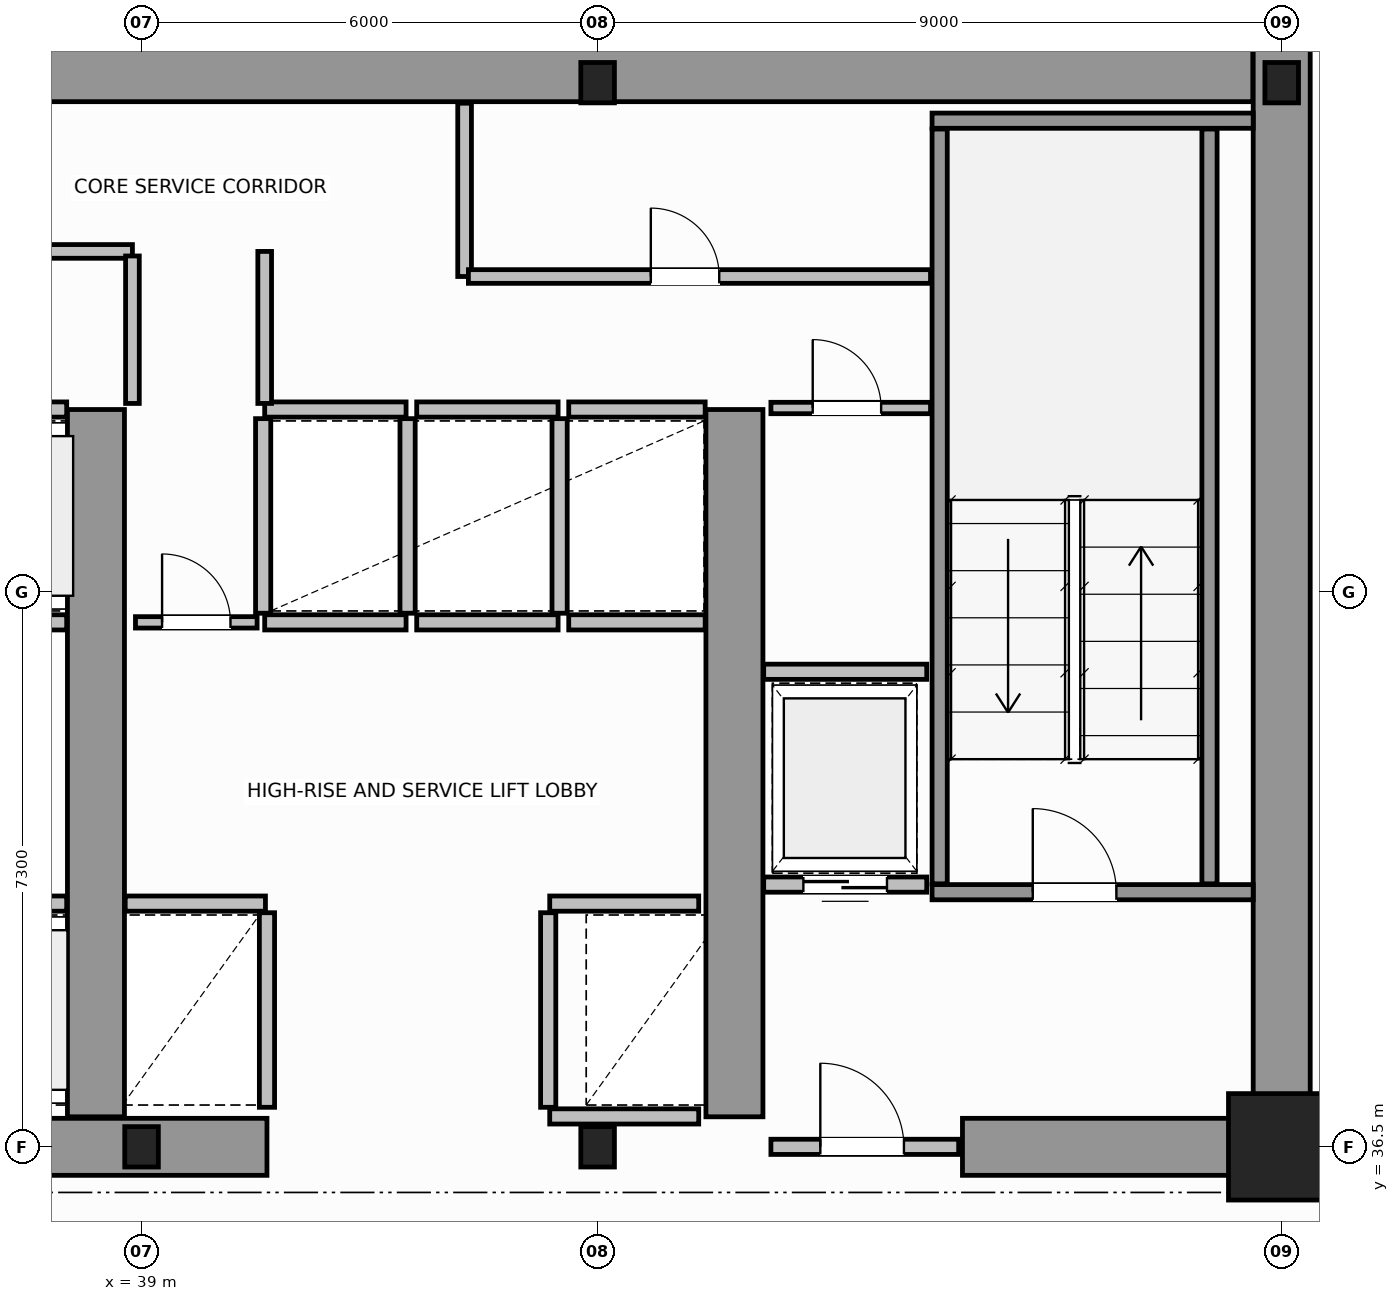
"""IFC4 building model, lengths in metres.
Left out: names, types, materials, properties, quantities, classifications, styles, units other than length and angle.
Written with IfcOpenShell. Run it as: python <this file> out.ifc"""

import sys

from ifc_helpers import new_model, si_unit, direction, frame, frame_2d, origin, origin_2d, place, context, subcontext, project, spatial, rectangle, i_section, extrude, source, transform, mapped, element, fill, save


model = new_model("IFC4")
c1 = context("Model", 3, precision=1e-05, world=origin(), true_north=direction((0.0, 1.0)))
c2 = subcontext(c1, "Body", "Model", "MODEL_VIEW")
j1 = project(units=[si_unit("LENGTHUNIT", "METRE"), si_unit("PLANEANGLEUNIT", "RADIAN")], contexts=[c1])
p1 = place(None, origin())
s1 = spatial("IfcSite", under=j1, at=p1, CompositionType="ELEMENT")
p2 = place(p1, origin())
s2 = spatial("IfcBuilding", under=s1, at=p2, CompositionType="ELEMENT")
p3 = place(p2, frame((0.0, 0.0, 122.4)))
s3 = spatial("IfcBuildingStorey", under=s2, at=p3, CompositionType="ELEMENT", Elevation=122.4)
m1 = source(origin(), c2, "Body", "SweptSolid", [
    extrude(i_section(OverallWidth=0.442, OverallDepth=0.531, WebThickness=0.065, FlangeThickness=0.076, FilletRadius=0.015, at=origin_2d()), origin(), (0.0, 0.0, 1.0), 3.8),
])
for number, where, z_axis, x_axis in (
    (1, (39.0, 36.5, 0.0), (0.0, 0.0, 1.0), (1.0, 0.0, 0.0)),
    (2, (45.0, 36.5, 0.0), (0.0, 0.0, 1.0), (1.0, 0.0, 0.0)),
):
    element("IfcColumn", number, at=place(p3, frame(where, z_axis=z_axis, x_axis=x_axis)), inside=s3, PredefinedType="COLUMN", context=c2, shape_type="MappedRepresentation", body=[
        mapped(m1, transform((0.0, 0.0, 0.0), scale=1.0)),
    ])
m2 = source(origin(), c2, "Body", "SweptSolid", [
    extrude(rectangle(XDim=1.4, YDim=1.4, at=origin_2d()), origin(), (0.0, 0.0, 1.0), 3.8),
])
p4 = place(p3, frame((54.0, 36.5, 0.0), z_axis=(0.0, 0.0, 1.0), x_axis=(1.0, 0.0, 0.0)))
e3 = element("IfcColumn", 3, at=p4, inside=s3, PredefinedType="COLUMN", context=c2, shape_type="MappedRepresentation", body=[
    mapped(m2, transform((0.0, 0.0, 0.0), scale=1.0)),
])
for number, where, z_axis, x_axis in (
    (4, (45.0, 50.5, 0.0), (0.0, 0.0, 1.0), (1.0, 0.0, 0.0)),
    (5, (54.0, 50.5, 0.0), (0.0, 0.0, 1.0), (1.0, 0.0, 0.0)),
):
    element("IfcColumn", number, at=place(p3, frame(where, z_axis=z_axis, x_axis=x_axis)), inside=s3, PredefinedType="COLUMN", context=c2, shape_type="MappedRepresentation", body=[
        mapped(m1, transform((0.0, 0.0, 0.0), scale=1.0)),
    ])
p5 = place(p3, frame((34.002, 50.625, 0.0), z_axis=(0.0, 0.0, 1.0), x_axis=(1.0, 0.0, 0.0)))
e6 = element("IfcWall", 6, at=p5, inside=s3, PredefinedType="SHEAR", context=c2, shape_type="SweptSolid", body=[
    extrude(rectangle(XDim=19.619, YDim=0.75, at=frame_2d((9.81, 0.0))), origin(), (0.0, 0.0, 1.0), 3.8),
])
p6 = place(p3, frame((54.0, 36.5, 0.0), z_axis=(0.0, 0.0, 1.0), x_axis=(0.0, 1.0, 0.0)))
e7 = element("IfcWall", 7, at=p6, inside=s3, PredefinedType="SHEAR", context=c2, shape_type="SweptSolid", body=[
    extrude(rectangle(XDim=14.5, YDim=0.75, at=frame_2d((7.25, 0.0))), origin(), (0.0, 0.0, 1.0), 3.8),
])
p7 = place(p3, frame((36.15, 36.5, 0.0), z_axis=(0.0, 0.0, 1.0), x_axis=(1.0, 0.0, 0.0)))
e8 = element("IfcWall", 8, at=p7, inside=s3, PredefinedType="SHEAR", context=c2, shape_type="SweptSolid", body=[
    extrude(rectangle(XDim=4.5, YDim=0.75, at=frame_2d((2.25, 0.0))), origin(), (0.0, 0.0, 1.0), 3.8),
])
p8 = place(p3, frame((49.8, 36.5, 0.0), z_axis=(0.0, 0.0, 1.0), x_axis=(1.0, 0.0, 0.0)))
e9 = element("IfcWall", 9, at=p8, inside=s3, PredefinedType="SHEAR", context=c2, shape_type="SweptSolid", body=[
    extrude(rectangle(XDim=3.805, YDim=0.75, at=frame_2d((1.902, 0.0))), origin(), (0.0, 0.0, 1.0), 2.38),
])
for number, where, z_axis, x_axis in (
    (10, (38.4, 36.895, 0.0), (0.0, 0.0, 1.0), (0.0, 1.0, 0.0)),
    (11, (46.8, 36.895, 0.0), (0.0, 0.0, 1.0), (0.0, 1.0, 0.0)),
):
    element("IfcWall", number, at=place(p3, frame(where, z_axis=z_axis, x_axis=x_axis)), inside=s3, PredefinedType="SHEAR", context=c2, shape_type="SweptSolid", body=[
        extrude(rectangle(XDim=9.305, YDim=0.75, at=frame_2d((4.652, 0.0))), origin(), (0.0, 0.0, 1.0), 3.8),
    ])
p9 = place(p3, frame((49.4, 39.85, 0.0), z_axis=(0.0, 0.0, 1.0), x_axis=(1.0, 0.0, 0.0)))
e12 = element("IfcWall", 12, at=p9, inside=s3, PredefinedType="SOLIDWALL", context=c2, shape_type="SweptSolid", body=[
    extrude(rectangle(XDim=4.225, YDim=0.2, at=frame_2d((2.113, 0.0))), origin(), (0.0, 0.0, 1.0), 3.8),
])
p10 = place(p9, frame((1.325, 0.0, 0.0)))
e13 = element("IfcOpeningElement", 13, at=p10, cuts=e12, PredefinedType="OPENING", context=c2, shape_type="SweptSolid", body=[
    extrude(rectangle(XDim=1.1, YDim=2.15, at=frame_2d((0.55, 1.075))), frame((0.0, 0.11, 0.0), z_axis=(0.0, -1.0, 0.0), x_axis=(1.0, 0.0, 0.0)), (0.0, 0.0, 1.0), 0.22),
])
p11 = place(p3, frame((49.4, 50.0, 0.0), z_axis=(0.0, 0.0, 1.0), x_axis=(1.0, 0.0, 0.0)))
e14 = element("IfcWall", 14, at=p11, inside=s3, PredefinedType="SOLIDWALL", context=c2, shape_type="SweptSolid", body=[
    extrude(rectangle(XDim=4.225, YDim=0.2, at=frame_2d((2.113, 0.0))), origin(), (0.0, 0.0, 1.0), 3.8),
])
for number, where, z_axis, x_axis in (
    (15, (49.5, 39.96, 0.0), (0.0, 0.0, 1.0), (0.0, 1.0, 0.0)),
    (16, (53.05, 39.96, 0.0), (0.0, 0.0, 1.0), (0.0, 1.0, 0.0)),
):
    element("IfcWall", number, at=place(p3, frame(where, z_axis=z_axis, x_axis=x_axis)), inside=s3, PredefinedType="SOLIDWALL", context=c2, shape_type="SweptSolid", body=[
        extrude(rectangle(XDim=9.93, YDim=0.2, at=frame_2d((4.965, 0.0))), origin(), (0.0, 0.0, 1.0), 3.8),
    ])
p12 = place(p3, frame((47.28, 36.5, 0.0), z_axis=(0.0, 0.0, 1.0), x_axis=(1.0, 0.0, 0.0)))
e17 = element("IfcWall", 17, at=p12, inside=s3, PredefinedType="SOLIDWALL", context=c2, shape_type="SweptSolid", body=[
    extrude(rectangle(XDim=2.47, YDim=0.2, at=frame_2d((1.235, 0.0))), origin(), (0.0, 0.0, 1.0), 2.37),
])
p13 = place(p12, frame((0.65, 0.0, 0.0)))
e18 = element("IfcOpeningElement", 18, at=p13, cuts=e17, PredefinedType="OPENING", context=c2, shape_type="SweptSolid", body=[
    extrude(rectangle(XDim=1.1, YDim=2.15, at=frame_2d((0.55, 1.075))), frame((0.0, 0.11, 0.0), z_axis=(0.0, -1.0, 0.0), x_axis=(1.0, 0.0, 0.0)), (0.0, 0.0, 1.0), 0.22),
])
p14 = place(p3, frame((36.17, 39.7, 0.0), z_axis=(0.0, 0.0, 1.0), x_axis=(1.0, 0.0, 0.0)))
e19 = element("IfcWall", 19, at=p14, inside=s3, PredefinedType="SOLIDWALL", context=c2, shape_type="SweptSolid", body=[
    extrude(rectangle(XDim=1.845, YDim=0.2, at=frame_2d((0.922, 0.0))), origin(), (0.0, 0.0, 1.0), 3.58),
])
p15 = place(p14, frame((0.372, 0.0, 0.0)))
e20 = element("IfcOpeningElement", 20, at=p15, cuts=e19, PredefinedType="OPENING", context=c2, shape_type="SweptSolid", body=[
    extrude(rectangle(XDim=1.1, YDim=2.15, at=frame_2d((0.55, 1.075))), frame((0.0, 0.11, 0.0), z_axis=(0.0, -1.0, 0.0), x_axis=(1.0, 0.0, 0.0)), (0.0, 0.0, 1.0), 0.22),
])
p16 = place(p3, frame((36.29, 43.4, 0.0), z_axis=(0.0, 0.0, 1.0), x_axis=(1.0, 0.0, 0.0)))
e21 = element("IfcWall", 21, at=p16, inside=s3, PredefinedType="SOLIDWALL", context=c2, shape_type="SweptSolid", body=[
    extrude(rectangle(XDim=1.725, YDim=0.2, at=frame_2d((0.862, 0.0))), origin(), (0.0, 0.0, 1.0), 3.58),
])
p17 = place(p16, frame((0.313, 0.0, 0.0)))
e22 = element("IfcOpeningElement", 22, at=p17, cuts=e21, PredefinedType="OPENING", context=c2, shape_type="SweptSolid", body=[
    extrude(rectangle(XDim=1.1, YDim=2.15, at=frame_2d((0.55, 1.075))), frame((0.0, 0.11, 0.0), z_axis=(0.0, -1.0, 0.0), x_axis=(1.0, 0.0, 0.0)), (0.0, 0.0, 1.0), 0.22),
])
p18 = place(p3, frame((36.29, 46.2, 0.0), z_axis=(0.0, 0.0, 1.0), x_axis=(1.0, 0.0, 0.0)))
e23 = element("IfcWall", 23, at=p18, inside=s3, PredefinedType="SOLIDWALL", context=c2, shape_type="SweptSolid", body=[
    extrude(rectangle(XDim=1.725, YDim=0.2, at=frame_2d((0.862, 0.0))), origin(), (0.0, 0.0, 1.0), 3.58),
])
p19 = place(p3, frame((38.785, 39.7, 0.0), z_axis=(0.0, 0.0, 1.0), x_axis=(1.0, 0.0, 0.0)))
e24 = element("IfcWall", 24, at=p19, inside=s3, PredefinedType="SOLIDWALL", context=c2, shape_type="SweptSolid", body=[
    extrude(rectangle(XDim=1.845, YDim=0.2, at=frame_2d((0.922, 0.0))), origin(), (0.0, 0.0, 1.0), 3.58),
])
p20 = place(p3, frame((40.65, 37.02, 0.0), z_axis=(0.0, 0.0, 1.0), x_axis=(0.0, 1.0, 0.0)))
e25 = element("IfcWall", 25, at=p20, inside=s3, PredefinedType="SOLIDWALL", context=c2, shape_type="SweptSolid", body=[
    extrude(rectangle(XDim=2.56, YDim=0.2, at=frame_2d((1.28, 0.0))), origin(), (0.0, 0.0, 1.0), 3.58),
])
p21 = place(p3, frame((44.37, 39.7, 0.0), z_axis=(0.0, 0.0, 1.0), x_axis=(1.0, 0.0, 0.0)))
e26 = element("IfcWall", 26, at=p21, inside=s3, PredefinedType="SOLIDWALL", context=c2, shape_type="SweptSolid", body=[
    extrude(rectangle(XDim=1.96, YDim=0.2, at=frame_2d((0.98, 0.0))), origin(), (0.0, 0.0, 1.0), 3.58),
])
p22 = place(p3, frame((44.37, 36.9, 0.0), z_axis=(0.0, 0.0, 1.0), x_axis=(1.0, 0.0, 0.0)))
e27 = element("IfcWall", 27, at=p22, inside=s3, PredefinedType="SOLIDWALL", context=c2, shape_type="SweptSolid", body=[
    extrude(rectangle(XDim=1.96, YDim=0.2, at=frame_2d((0.98, 0.0))), origin(), (0.0, 0.0, 1.0), 2.37),
])
p23 = place(p3, frame((44.35, 37.02, 0.0), z_axis=(0.0, 0.0, 1.0), x_axis=(0.0, 1.0, 0.0)))
e28 = element("IfcWall", 28, at=p23, inside=s3, PredefinedType="SOLIDWALL", context=c2, shape_type="SweptSolid", body=[
    extrude(rectangle(XDim=2.56, YDim=0.2, at=frame_2d((1.28, 0.0))), origin(), (0.0, 0.0, 1.0), 3.58),
])
for number, where, z_axis, x_axis in (
    (29, (40.62, 43.4, 0.0), (0.0, 0.0, 1.0), (1.0, 0.0, 0.0)),
    (30, (40.62, 46.2, 0.0), (0.0, 0.0, 1.0), (1.0, 0.0, 0.0)),
):
    element("IfcWall", number, at=place(p3, frame(where, z_axis=z_axis, x_axis=x_axis)), inside=s3, PredefinedType="SOLIDWALL", context=c2, shape_type="SweptSolid", body=[
        extrude(rectangle(XDim=1.86, YDim=0.2, at=frame_2d((0.93, 0.0))), origin(), (0.0, 0.0, 1.0), 3.58),
    ])
for number, where, z_axis, x_axis in (
    (31, (40.6, 43.52, 0.0), (0.0, 0.0, 1.0), (0.0, 1.0, 0.0)),
    (32, (42.5, 43.52, 0.0), (0.0, 0.0, 1.0), (0.0, 1.0, 0.0)),
):
    element("IfcWall", number, at=place(p3, frame(where, z_axis=z_axis, x_axis=x_axis)), inside=s3, PredefinedType="SOLIDWALL", context=c2, shape_type="SweptSolid", body=[
        extrude(rectangle(XDim=2.56, YDim=0.2, at=frame_2d((1.28, 0.0))), origin(), (0.0, 0.0, 1.0), 3.58),
    ])
for number, where, z_axis, x_axis in (
    (33, (42.62, 43.4, 0.0), (0.0, 0.0, 1.0), (1.0, 0.0, 0.0)),
    (34, (42.62, 46.2, 0.0), (0.0, 0.0, 1.0), (1.0, 0.0, 0.0)),
):
    element("IfcWall", number, at=place(p3, frame(where, z_axis=z_axis, x_axis=x_axis)), inside=s3, PredefinedType="SOLIDWALL", context=c2, shape_type="SweptSolid", body=[
        extrude(rectangle(XDim=1.86, YDim=0.2, at=frame_2d((0.93, 0.0))), origin(), (0.0, 0.0, 1.0), 3.58),
    ])
p24 = place(p3, frame((44.5, 43.52, 0.0), z_axis=(0.0, 0.0, 1.0), x_axis=(0.0, 1.0, 0.0)))
e35 = element("IfcWall", 35, at=p24, inside=s3, PredefinedType="SOLIDWALL", context=c2, shape_type="SweptSolid", body=[
    extrude(rectangle(XDim=2.56, YDim=0.2, at=frame_2d((1.28, 0.0))), origin(), (0.0, 0.0, 1.0), 3.58),
])
for number, where, z_axis, x_axis in (
    (36, (44.62, 43.4, 0.0), (0.0, 0.0, 1.0), (1.0, 0.0, 0.0)),
    (37, (44.62, 46.2, 0.0), (0.0, 0.0, 1.0), (1.0, 0.0, 0.0)),
):
    element("IfcWall", number, at=place(p3, frame(where, z_axis=z_axis, x_axis=x_axis)), inside=s3, PredefinedType="SOLIDWALL", context=c2, shape_type="SweptSolid", body=[
        extrude(rectangle(XDim=1.795, YDim=0.2, at=frame_2d((0.897, 0.0))), origin(), (0.0, 0.0, 1.0), 3.58),
    ])
p25 = place(p3, frame((47.185, 39.95, 0.0), z_axis=(0.0, 0.0, 1.0), x_axis=(1.0, 0.0, 0.0)))
e38 = element("IfcWall", 38, at=p25, inside=s3, PredefinedType="SOLIDWALL", context=c2, shape_type="SweptSolid", body=[
    extrude(rectangle(XDim=2.145, YDim=0.2, at=frame_2d((1.073, 0.0))), origin(), (0.0, 0.0, 1.0), 3.58),
])
p26 = place(p25, frame((0.522, 0.0, 0.0)))
e39 = element("IfcOpeningElement", 39, at=p26, cuts=e38, PredefinedType="OPENING", context=c2, shape_type="SweptSolid", body=[
    extrude(rectangle(XDim=1.1, YDim=2.15, at=frame_2d((0.55, 1.075))), frame((0.0, 0.11, 0.0), z_axis=(0.0, -1.0, 0.0), x_axis=(1.0, 0.0, 0.0)), (0.0, 0.0, 1.0), 0.22),
])
p27 = place(p3, frame((47.185, 42.75, 0.0), z_axis=(0.0, 0.0, 1.0), x_axis=(1.0, 0.0, 0.0)))
e40 = element("IfcWall", 40, at=p27, inside=s3, PredefinedType="SOLIDWALL", context=c2, shape_type="SweptSolid", body=[
    extrude(rectangle(XDim=2.145, YDim=0.2, at=frame_2d((1.073, 0.0))), origin(), (0.0, 0.0, 1.0), 3.58),
])
p28 = place(p3, frame((47.28, 46.22, 0.0), z_axis=(0.0, 0.0, 1.0), x_axis=(1.0, 0.0, 0.0)))
e41 = element("IfcWall", 41, at=p28, inside=s3, PredefinedType="PARTITIONING", context=c2, shape_type="SweptSolid", body=[
    extrude(rectangle(XDim=2.1, YDim=0.15, at=frame_2d((1.05, 0.0))), origin(), (0.0, 0.0, 1.0), 3.58),
])
p29 = place(p28, frame((0.55, 0.0, 0.0)))
e42 = element("IfcOpeningElement", 42, at=p29, cuts=e41, PredefinedType="OPENING", context=c2, shape_type="SweptSolid", body=[
    extrude(rectangle(XDim=0.9, YDim=2.1, at=frame_2d((0.45, 1.05))), frame((0.0, 0.085, 0.0), z_axis=(0.0, -1.0, 0.0), x_axis=(1.0, 0.0, 0.0)), (0.0, 0.0, 1.0), 0.17),
])
p30 = place(p3, frame((38.92, 43.4, 0.0), z_axis=(0.0, 0.0, 1.0), x_axis=(1.0, 0.0, 0.0)))
e43 = element("IfcWall", 43, at=p30, inside=s3, PredefinedType="PARTITIONING", context=c2, shape_type="SweptSolid", body=[
    extrude(rectangle(XDim=1.6, YDim=0.15, at=frame_2d((0.8, 0.0))), origin(), (0.0, 0.0, 1.0), 3.58),
])
p31 = place(p30, frame((0.35, 0.0, 0.0)))
e44 = element("IfcOpeningElement", 44, at=p31, cuts=e43, PredefinedType="OPENING", context=c2, shape_type="SweptSolid", body=[
    extrude(rectangle(XDim=0.9, YDim=2.1, at=frame_2d((0.45, 1.05))), frame((0.0, 0.085, 0.0), z_axis=(0.0, -1.0, 0.0), x_axis=(1.0, 0.0, 0.0)), (0.0, 0.0, 1.0), 0.17),
])
p32 = place(p3, frame((23.85, 48.28, 0.0), z_axis=(0.0, 0.0, 1.0), x_axis=(1.0, 0.0, 0.0)))
e45 = element("IfcWall", 45, at=p32, inside=s3, PredefinedType="PLUMBINGWALL", context=c2, shape_type="SweptSolid", body=[
    extrude(rectangle(XDim=15.03, YDim=0.18, at=frame_2d((7.515, 0.0))), origin(), (0.0, 0.0, 1.0), 3.58),
])
p33 = place(p32, frame((2.9, 0.0, 0.0)))
e46 = element("IfcOpeningElement", 46, at=p33, cuts=e45, PredefinedType="OPENING", context=c2, shape_type="SweptSolid", body=[
    extrude(rectangle(XDim=0.9, YDim=2.15, at=frame_2d((0.45, 1.075))), frame((0.0, 0.1, 0.0), z_axis=(0.0, -1.0, 0.0), x_axis=(1.0, 0.0, 0.0)), (0.0, 0.0, 1.0), 0.2),
])
p34 = place(p32, frame((10.4, 0.0, 0.0)))
e47 = element("IfcOpeningElement", 47, at=p34, cuts=e45, PredefinedType="OPENING", context=c2, shape_type="SweptSolid", body=[
    extrude(rectangle(XDim=0.9, YDim=2.15, at=frame_2d((0.45, 1.075))), frame((0.0, 0.1, 0.0), z_axis=(0.0, -1.0, 0.0), x_axis=(1.0, 0.0, 0.0)), (0.0, 0.0, 1.0), 0.2),
])
p35 = place(p3, frame((38.88, 46.28, 0.0), z_axis=(0.0, 0.0, 1.0), x_axis=(0.0, 1.0, 0.0)))
e48 = element("IfcWall", 48, at=p35, inside=s3, PredefinedType="PLUMBINGWALL", context=c2, shape_type="SweptSolid", body=[
    extrude(rectangle(XDim=1.94, YDim=0.18, at=frame_2d((0.97, 0.0))), origin(), (0.0, 0.0, 1.0), 3.58),
])
p36 = place(p3, frame((40.62, 46.28, 0.0), z_axis=(0.0, 0.0, 1.0), x_axis=(0.0, 1.0, 0.0)))
e49 = element("IfcWall", 49, at=p36, inside=s3, PredefinedType="PLUMBINGWALL", context=c2, shape_type="SweptSolid", body=[
    extrude(rectangle(XDim=2.0, YDim=0.18, at=frame_2d((1.0, 0.0))), origin(), (0.0, 0.0, 1.0), 3.58),
])
p37 = place(p3, frame((43.25, 47.95, 0.0), z_axis=(0.0, 0.0, 1.0), x_axis=(0.0, 1.0, 0.0)))
e50 = element("IfcWall", 50, at=p37, inside=s3, PredefinedType="PLUMBINGWALL", context=c2, shape_type="SweptSolid", body=[
    extrude(rectangle(XDim=2.28, YDim=0.18, at=frame_2d((1.14, 0.0))), origin(), (0.0, 0.0, 1.0), 3.58),
])
p38 = place(p3, frame((43.3, 47.95, 0.0), z_axis=(0.0, 0.0, 1.0), x_axis=(1.0, 0.0, 0.0)))
e51 = element("IfcWall", 51, at=p38, inside=s3, PredefinedType="PLUMBINGWALL", context=c2, shape_type="SweptSolid", body=[
    extrude(rectangle(XDim=6.08, YDim=0.18, at=frame_2d((3.04, 0.0))), origin(), (0.0, 0.0, 1.0), 3.58),
])
p39 = place(p38, frame((2.4, 0.0, 0.0)))
e52 = element("IfcOpeningElement", 52, at=p39, cuts=e51, PredefinedType="OPENING", context=c2, shape_type="SweptSolid", body=[
    extrude(rectangle(XDim=0.9, YDim=2.15, at=frame_2d((0.45, 1.075))), frame((0.0, 0.1, 0.0), z_axis=(0.0, -1.0, 0.0), x_axis=(1.0, 0.0, 0.0)), (0.0, 0.0, 1.0), 0.2),
])
p40 = place(p3, frame((54.06, 36.48, 0.0), z_axis=(0.0, 0.0, 1.0), x_axis=(1.0, 0.0, 0.0)))
e53 = element("IfcWall", 53, at=p40, inside=s3, PredefinedType="PARTITIONING", context=c2, shape_type="SweptSolid", body=[
    extrude(rectangle(XDim=6.672, YDim=0.12, at=frame_2d((3.336, 0.0))), origin(), (0.0, 0.0, 1.0), 2.87),
])
p41 = place(p40, frame((2.886, 0.0, 0.0)))
e54 = element("IfcOpeningElement", 54, at=p41, cuts=e53, PredefinedType="OPENING", context=c2, shape_type="SweptSolid", body=[
    extrude(rectangle(XDim=0.9, YDim=2.15, at=frame_2d((0.45, 1.075))), frame((0.0, 0.07, 0.0), z_axis=(0.0, -1.0, 0.0), x_axis=(1.0, 0.0, 0.0)), (0.0, 0.0, 1.0), 0.14),
])
m3 = source(origin(), c2, "Body", "SweptSolid", [
    extrude(rectangle(XDim=1.1, YDim=2.15, at=frame_2d((0.55, 1.075))), frame((0.0, 0.025, 0.0), z_axis=(0.0, -1.0, 0.0), x_axis=(1.0, 0.0, 0.0)), (0.0, 0.0, 1.0), 0.05),
])
p42 = place(p10, origin())
e55 = element("IfcDoor", 55, at=p42, inside=s3, OperationType="SINGLE_SWING_RIGHT", PredefinedType="DOOR", context=c2, shape_type="MappedRepresentation", body=[
    mapped(m3, transform((0.0, 0.0, 0.0), scale=1.0)),
])
fill(e13, e55)
p43 = place(p13, origin())
e56 = element("IfcDoor", 56, at=p43, inside=s3, OperationType="SINGLE_SWING_LEFT", PredefinedType="DOOR", context=c2, shape_type="MappedRepresentation", body=[
    mapped(m3, transform((0.0, 0.0, 0.0), scale=1.0)),
])
fill(e18, e56)
p44 = place(p26, origin())
e57 = element("IfcDoor", 57, at=p44, inside=s3, OperationType="DOUBLE_DOOR_SLIDING", PredefinedType="DOOR", context=c2, shape_type="MappedRepresentation", body=[
    mapped(m3, transform((0.0, 0.0, 0.0), scale=1.0)),
])
fill(e39, e57)
m4 = source(origin(), c2, "Body", "SweptSolid", [
    extrude(rectangle(XDim=0.9, YDim=2.1, at=frame_2d((0.45, 1.05))), frame((0.0, 0.025, 0.0), z_axis=(0.0, -1.0, 0.0), x_axis=(1.0, 0.0, 0.0)), (0.0, 0.0, 1.0), 0.05),
])
p45 = place(p29, origin())
e58 = element("IfcDoor", 58, at=p45, inside=s3, OperationType="SINGLE_SWING_RIGHT", PredefinedType="DOOR", context=c2, shape_type="MappedRepresentation", body=[
    mapped(m4, transform((0.0, 0.0, 0.0), scale=1.0)),
])
fill(e42, e58)
p46 = place(p31, origin())
e59 = element("IfcDoor", 59, at=p46, inside=s3, OperationType="SINGLE_SWING_LEFT", PredefinedType="DOOR", context=c2, shape_type="MappedRepresentation", body=[
    mapped(m4, transform((0.0, 0.0, 0.0), scale=1.0)),
])
fill(e44, e59)
m5 = source(origin(), c2, "Body", "SweptSolid", [
    extrude(rectangle(XDim=0.9, YDim=2.15, at=frame_2d((0.45, 1.075))), frame((0.0, 0.025, 0.0), z_axis=(0.0, -1.0, 0.0), x_axis=(1.0, 0.0, 0.0)), (0.0, 0.0, 1.0), 0.05),
])
p47 = place(p39, origin())
e60 = element("IfcDoor", 60, at=p47, inside=s3, OperationType="SINGLE_SWING_RIGHT", PredefinedType="DOOR", context=c2, shape_type="MappedRepresentation", body=[
    mapped(m5, transform((0.0, 0.0, 0.0), scale=1.0)),
])
fill(e52, e60)
save(model, sys.argv[1])
